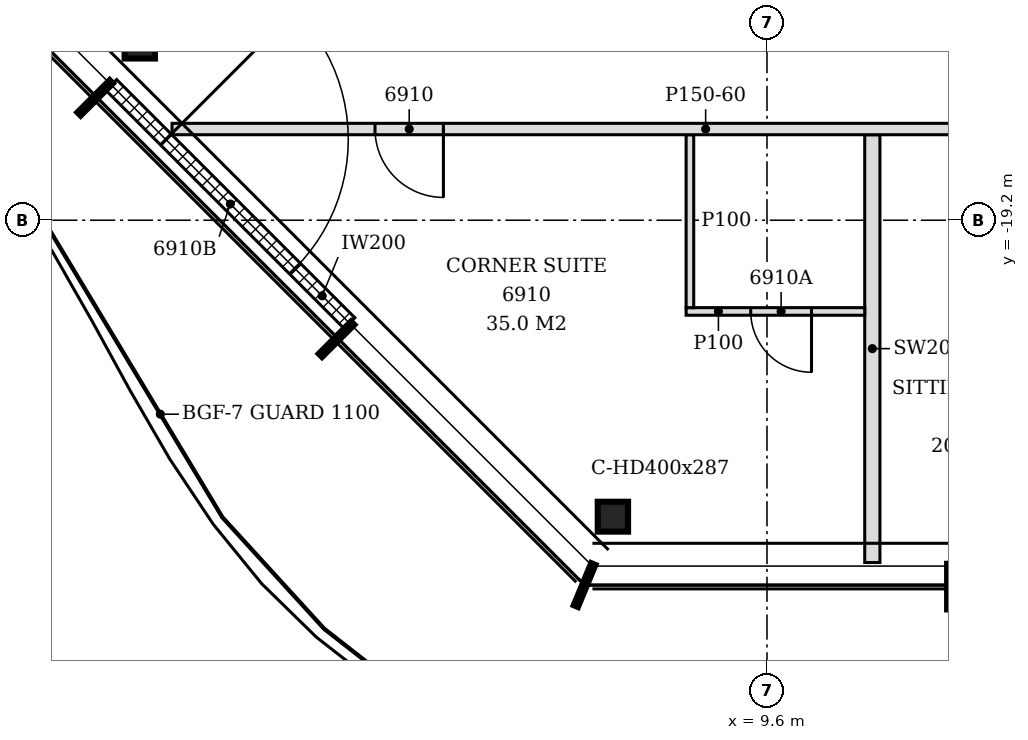
"""IFC4 building model, lengths in metres.
Left out: names, types, materials, properties, quantities, classifications, styles, units other than length and angle.
Written with IfcOpenShell. Run it as: python <this file> out.ifc"""

import sys

from ifc_helpers import new_model, si_unit, direction, frame, frame_2d, origin, origin_2d, place, context, subcontext, project, spatial, polyline, rectangle, i_section, outline, extrude, element, fill, save


model = new_model("IFC4")
c1 = context("Model", 3, precision=1e-05, world=origin(), true_north=direction((0.0, 1.0)))
c2 = subcontext(c1, "Body", "Model", "MODEL_VIEW")
j1 = project(units=[si_unit("LENGTHUNIT", "METRE"), si_unit("PLANEANGLEUNIT", "RADIAN")], contexts=[c1])
p1 = place(None, origin())
s1 = spatial("IfcSite", under=j1, at=p1, CompositionType="ELEMENT")
p2 = place(p1, origin())
s2 = spatial("IfcBuilding", under=s1, at=p2, CompositionType="ELEMENT")
p3 = place(p2, frame((0.0, 0.0, 270.6)))
s3 = spatial("IfcBuildingStorey", under=s2, at=p3, CompositionType="ELEMENT", Elevation=270.6)
for number, where, z_axis, x_axis in (
    (1, (7.573, -23.1, -0.15), (0.0, 0.0, 1.0), (1.0, 0.0, 0.0)),
    (2, (1.348, -16.876, -0.15), (0.0, 0.0, 1.0), (1.0, 0.0, 0.0)),
):
    element("IfcColumn", number, at=place(p3, frame(where, z_axis=z_axis, x_axis=x_axis)), inside=s3, PredefinedType="COLUMN", context=c2, shape_type="SweptSolid", body=[
        extrude(i_section(OverallWidth=0.399, OverallDepth=0.393, WebThickness=0.023, FlangeThickness=0.037, FilletRadius=0.015, at=origin_2d()), origin(), (0.0, 0.0, 1.0), 3.6),
    ])
p4 = place(p3, frame((0.974, -17.42, 0.0), z_axis=(0.0, 0.0, 1.0), x_axis=(0.707079231393, -0.707134329907, 0.0)))
e3 = element("IfcWall", 3, at=p4, inside=s3, PredefinedType="NOTDEFINED", context=c2, shape_type="SweptSolid", body=[
    extrude(rectangle(XDim=4.431, YDim=0.2, at=frame_2d((2.215, 0.0))), origin(), (0.0, 0.0, 1.0), 3.45),
])
p5 = place(p4, frame((1.015, 0.0, 0.0)))
e4 = element("IfcOpeningElement", 4, at=p5, cuts=e3, PredefinedType="OPENING", context=c2, shape_type="SweptSolid", body=[
    extrude(rectangle(XDim=2.4, YDim=2.4, at=frame_2d((1.2, 1.2))), frame((0.0, 0.11, 0.0), z_axis=(0.0, -1.0, 0.0), x_axis=(1.0, 0.0, 0.0)), (0.0, 0.0, 1.0), 0.22),
])
p6 = place(p3, frame((10.986, -23.703, 0.0), z_axis=(0.0, 0.0, 1.0), x_axis=(0.0, 1.0, 0.0)))
e5 = element("IfcWall", 5, at=p6, inside=s3, PredefinedType="PARTITIONING", context=c2, shape_type="SweptSolid", body=[
    extrude(outline(polyline([(0.0, 0.0), (5.628, 0.0), (5.628, 3.45), (4.608, 3.45), (4.606, 2.88), (4.398, 2.88), (4.396, 3.45), (0.753, 3.45), (0.751, 2.93), (0.453, 2.93), (0.451, 3.45), (0.0, 3.45), (0.0, 0.0)])), frame((0.0, 0.1, 0.0), z_axis=(0.0, -1.0, 0.0), x_axis=(1.0, 0.0, 0.0)), (0.0, 0.0, 1.0), 0.2),
])
p7 = place(p3, frame((8.536, -20.4, 0.0), z_axis=(0.0, 0.0, 1.0), x_axis=(1.0, 0.0, 0.0)))
e6 = element("IfcWall", 6, at=p7, inside=s3, PredefinedType="PARTITIONING", context=c2, shape_type="SweptSolid", body=[
    extrude(rectangle(XDim=2.35, YDim=0.1, at=frame_2d((1.175, 0.0))), origin(), (0.0, 0.0, 1.0), 3.45),
])
p8 = place(p7, frame((0.85, 0.0, 0.0)))
e7 = element("IfcOpeningElement", 7, at=p8, cuts=e6, PredefinedType="OPENING", context=c2, shape_type="SweptSolid", body=[
    extrude(rectangle(XDim=0.8, YDim=2.1, at=frame_2d((0.4, 1.05))), frame((0.0, 0.06, 0.0), z_axis=(0.0, -1.0, 0.0), x_axis=(1.0, 0.0, 0.0)), (0.0, 0.0, 1.0), 0.12),
])
p9 = place(p3, frame((8.586, -20.35, 0.0), z_axis=(0.0, 0.0, 1.0), x_axis=(0.0, 1.0, 0.0)))
e8 = element("IfcWall", 8, at=p9, inside=s3, PredefinedType="PARTITIONING", context=c2, shape_type="SweptSolid", body=[
    extrude(outline(polyline([(0.0, 0.0), (2.275, 0.0), (2.275, 3.45), (1.255, 3.45), (1.253, 2.88), (1.045, 2.88), (1.043, 3.45), (0.0, 3.45), (0.0, 0.0)])), frame((0.0, 0.05, 0.0), z_axis=(0.0, -1.0, 0.0), x_axis=(1.0, 0.0, 0.0)), (0.0, 0.0, 1.0), 0.1),
])
p10 = place(p3, frame((1.773, -18.0, 0.0), z_axis=(0.0, 0.0, 1.0), x_axis=(1.0, 0.0, 0.0)))
e9 = element("IfcWall", 9, at=p10, inside=s3, PredefinedType="PARTITIONING", context=c2, shape_type="SweptSolid", body=[
    extrude(outline(polyline([(0.0, 0.0), (17.448, 0.0), (17.448, 2.73), (17.277, 2.73), (17.275, 3.45), (5.577, 3.45), (5.575, 2.73), (5.277, 2.73), (5.275, 3.45), (0.987, 3.45), (0.985, 2.93), (0.413, 2.93), (0.411, 3.45), (0.0, 3.45), (0.0, 0.0)])), frame((0.0, 0.075, 0.0), z_axis=(0.0, -1.0, 0.0), x_axis=(1.0, 0.0, 0.0)), (0.0, 0.0, 1.0), 0.15),
])
p11 = place(p10, frame((2.67, 0.0, 0.0)))
e10 = element("IfcOpeningElement", 10, at=p11, cuts=e9, PredefinedType="OPENING", context=c2, shape_type="SweptSolid", body=[
    extrude(rectangle(XDim=0.9, YDim=2.1, at=frame_2d((0.45, 1.05))), frame((0.0, 0.085, 0.0), z_axis=(0.0, -1.0, 0.0), x_axis=(1.0, 0.0, 0.0)), (0.0, 0.0, 1.0), 0.17),
])
p12 = place(p10, frame((10.47, 0.0, 0.0)))
e11 = element("IfcOpeningElement", 11, at=p12, cuts=e9, PredefinedType="OPENING", context=c2, shape_type="SweptSolid", body=[
    extrude(rectangle(XDim=0.9, YDim=2.1, at=frame_2d((0.45, 1.05))), frame((0.0, 0.085, 0.0), z_axis=(0.0, -1.0, 0.0), x_axis=(1.0, 0.0, 0.0)), (0.0, 0.0, 1.0), 0.17),
])
p13 = place(p5, origin())
e12 = element("IfcDoor", 12, at=p13, inside=s3, OperationType="SINGLE_SWING_LEFT", PredefinedType="DOOR", context=c2, shape_type="SweptSolid", body=[
    extrude(rectangle(XDim=2.4, YDim=2.4, at=frame_2d((1.2, 1.2))), frame((0.0, 0.025, 0.0), z_axis=(0.0, -1.0, 0.0), x_axis=(1.0, 0.0, 0.0)), (0.0, 0.0, 1.0), 0.05),
])
fill(e4, e12)
p14 = place(p11, frame((0.9, 0.0, 0.0), z_axis=(0.0, 0.0, 1.0), x_axis=(-1.0, 0.0, 0.0)))
e13 = element("IfcDoor", 13, at=p14, inside=s3, OperationType="SINGLE_SWING_LEFT", PredefinedType="DOOR", context=c2, shape_type="SweptSolid", body=[
    extrude(rectangle(XDim=0.9, YDim=2.1, at=frame_2d((0.45, 1.05))), frame((0.0, 0.025, 0.0), z_axis=(0.0, -1.0, 0.0), x_axis=(1.0, 0.0, 0.0)), (0.0, 0.0, 1.0), 0.05),
])
fill(e10, e13)
p15 = place(p8, frame((0.8, 0.0, 0.0), z_axis=(0.0, 0.0, 1.0), x_axis=(-1.0, 0.0, 0.0)))
e14 = element("IfcDoor", 14, at=p15, inside=s3, OperationType="SINGLE_SWING_LEFT", PredefinedType="DOOR", context=c2, shape_type="SweptSolid", body=[
    extrude(rectangle(XDim=0.8, YDim=2.1, at=frame_2d((0.4, 1.05))), frame((0.0, 0.025, 0.0), z_axis=(0.0, -1.0, 0.0), x_axis=(1.0, 0.0, 0.0)), (0.0, 0.0, 1.0), 0.05),
])
fill(e7, e14)
save(model, sys.argv[1])
